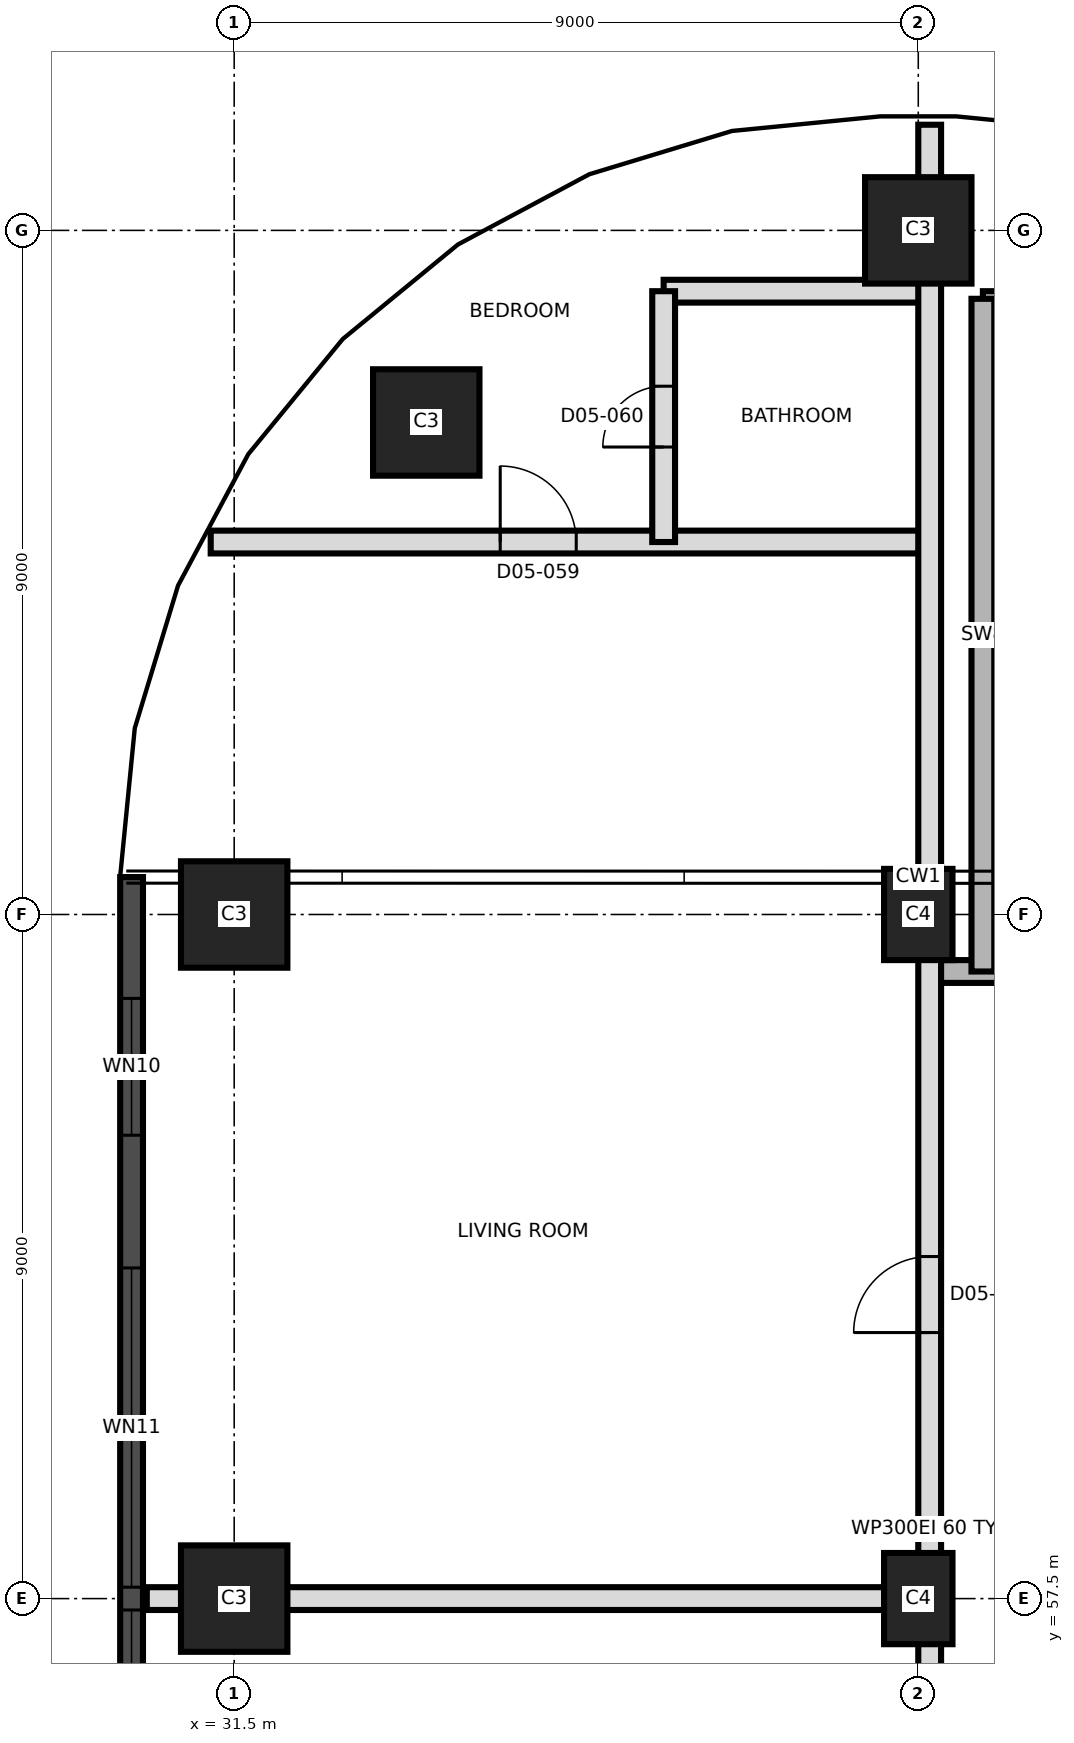
"""IFC4 building model, lengths in metres.
Left out: names, types, materials, properties, quantities, classifications, styles, units other than length and angle.
Written with IfcOpenShell. Run it as: python <this file> out.ifc"""

import sys

from ifc_helpers import new_model, si_unit, direction, frame, frame_2d, origin, origin_2d, place, context, subcontext, project, spatial, rectangle, extrude, element, fill, save


model = new_model("IFC4")
c1 = context("Model", 3, precision=1e-05, world=origin(), true_north=direction((0.0, 1.0)))
c2 = subcontext(c1, "Body", "Model", "MODEL_VIEW")
j1 = project(units=[si_unit("LENGTHUNIT", "METRE"), si_unit("PLANEANGLEUNIT", "RADIAN")], contexts=[c1])
p1 = place(None, origin())
s1 = spatial("IfcSite", under=j1, at=p1, CompositionType="ELEMENT")
p2 = place(p1, origin())
s2 = spatial("IfcBuilding", under=s1, at=p2, CompositionType="ELEMENT")
p3 = place(p2, frame((0.0, 0.0, 74.2)))
s3 = spatial("IfcBuildingStorey", under=s2, at=p3, CompositionType="ELEMENT", Elevation=74.2)
p4 = place(p3, frame((31.5, 57.5, 0.0), z_axis=(0.0, 0.0, 1.0), x_axis=(1.0, 0.0, 0.0)))
e1 = element("IfcColumn", 1, at=p4, inside=s3, PredefinedType="COLUMN", context=c2, shape_type="SweptSolid", body=[
    extrude(rectangle(XDim=1.4, YDim=1.4, at=origin_2d()), origin(), (0.0, 0.0, 1.0), 3.7),
])
p5 = place(p3, frame((40.5, 57.5, 0.0), z_axis=(0.0, 0.0, 1.0), x_axis=(0.0, 1.0, 0.0)))
e2 = element("IfcColumn", 2, at=p5, inside=s3, PredefinedType="COLUMN", context=c2, shape_type="SweptSolid", body=[
    extrude(rectangle(XDim=1.2, YDim=0.9, at=origin_2d()), origin(), (0.0, 0.0, 1.0), 3.7),
])
p6 = place(p3, frame((31.5, 66.5, 0.0), z_axis=(0.0, 0.0, 1.0), x_axis=(1.0, 0.0, 0.0)))
e3 = element("IfcColumn", 3, at=p6, inside=s3, PredefinedType="COLUMN", context=c2, shape_type="SweptSolid", body=[
    extrude(rectangle(XDim=1.4, YDim=1.4, at=origin_2d()), origin(), (0.0, 0.0, 1.0), 3.7),
])
p7 = place(p3, frame((40.5, 66.5, 0.0), z_axis=(0.0, 0.0, 1.0), x_axis=(0.0, 1.0, 0.0)))
e4 = element("IfcColumn", 4, at=p7, inside=s3, PredefinedType="COLUMN", context=c2, shape_type="SweptSolid", body=[
    extrude(rectangle(XDim=1.2, YDim=0.9, at=origin_2d()), origin(), (0.0, 0.0, 1.0), 3.7),
])
for number, where, z_axis, x_axis in (
    (5, (34.027, 72.973, 0.0), (0.0, 0.0, 1.0), (1.0, 0.0, 0.0)),
    (6, (40.5, 75.5, 0.0), (0.0, 0.0, 1.0), (1.0, 0.0, 0.0)),
):
    element("IfcColumn", number, at=place(p3, frame(where, z_axis=z_axis, x_axis=x_axis)), inside=s3, PredefinedType="COLUMN", context=c2, shape_type="SweptSolid", body=[
        extrude(rectangle(XDim=1.4, YDim=1.4, at=origin_2d()), origin(), (0.0, 0.0, 1.0), 3.7),
    ])
p8 = place(p3, frame((30.15, 66.992, 0.0), z_axis=(0.0, 0.0, 1.0), x_axis=(0.0, -1.0, 0.0)))
e7 = element("IfcWall", 7, at=p8, inside=s3, PredefinedType="SOLIDWALL", context=c2, shape_type="SweptSolid", body=[
    extrude(rectangle(XDim=32.968, YDim=0.3, at=frame_2d((16.484, 0.0))), origin(), (0.0, 0.0, 1.0), 3.4),
])
p9 = place(p8, frame((1.596, 0.0, 0.3)))
e8 = element("IfcOpeningElement", 8, at=p9, cuts=e7, PredefinedType="OPENING", context=c2, shape_type="SweptSolid", body=[
    extrude(rectangle(XDim=1.8, YDim=2.4, at=frame_2d((0.9, 1.2))), frame((0.0, 0.16, 0.0), z_axis=(0.0, -1.0, 0.0), x_axis=(1.0, 0.0, 0.0)), (0.0, 0.0, 1.0), 0.32),
])
p10 = place(p8, frame((5.142, 0.0, 0.9)))
e9 = element("IfcOpeningElement", 9, at=p10, cuts=e7, PredefinedType="OPENING", context=c2, shape_type="SweptSolid", body=[
    extrude(rectangle(XDim=4.2, YDim=1.5, at=frame_2d((2.1, 0.75))), frame((0.0, 0.16, 0.0), z_axis=(0.0, -1.0, 0.0), x_axis=(1.0, 0.0, 0.0)), (0.0, 0.0, 1.0), 0.32),
])
p11 = place(p8, frame((9.642, 0.0, 0.9)))
e10 = element("IfcOpeningElement", 10, at=p11, cuts=e7, PredefinedType="OPENING", context=c2, shape_type="SweptSolid", body=[
    extrude(rectangle(XDim=4.2, YDim=1.5, at=frame_2d((2.1, 0.75))), frame((0.0, 0.16, 0.0), z_axis=(0.0, -1.0, 0.0), x_axis=(1.0, 0.0, 0.0)), (0.0, 0.0, 1.0), 0.32),
])
p12 = place(p8, frame((14.142, 0.0, 0.9)))
e11 = element("IfcOpeningElement", 11, at=p12, cuts=e7, PredefinedType="OPENING", context=c2, shape_type="SweptSolid", body=[
    extrude(rectangle(XDim=4.2, YDim=1.5, at=frame_2d((2.1, 0.75))), frame((0.0, 0.16, 0.0), z_axis=(0.0, -1.0, 0.0), x_axis=(1.0, 0.0, 0.0)), (0.0, 0.0, 1.0), 0.32),
])
p13 = place(p8, frame((18.642, 0.0, 0.9)))
e12 = element("IfcOpeningElement", 12, at=p13, cuts=e7, PredefinedType="OPENING", context=c2, shape_type="SweptSolid", body=[
    extrude(rectangle(XDim=4.2, YDim=1.5, at=frame_2d((2.1, 0.75))), frame((0.0, 0.16, 0.0), z_axis=(0.0, -1.0, 0.0), x_axis=(1.0, 0.0, 0.0)), (0.0, 0.0, 1.0), 0.32),
])
p14 = place(p8, frame((23.142, 0.0, 0.9)))
e13 = element("IfcOpeningElement", 13, at=p14, cuts=e7, PredefinedType="OPENING", context=c2, shape_type="SweptSolid", body=[
    extrude(rectangle(XDim=4.2, YDim=1.5, at=frame_2d((2.1, 0.75))), frame((0.0, 0.16, 0.0), z_axis=(0.0, -1.0, 0.0), x_axis=(1.0, 0.0, 0.0)), (0.0, 0.0, 1.0), 0.32),
])
p15 = place(p8, frame((29.33, 0.0, 0.3)))
e14 = element("IfcOpeningElement", 14, at=p15, cuts=e7, PredefinedType="OPENING", context=c2, shape_type="SweptSolid", body=[
    extrude(rectangle(XDim=1.8, YDim=2.4, at=frame_2d((0.9, 1.2))), frame((0.0, 0.16, 0.0), z_axis=(0.0, -1.0, 0.0), x_axis=(1.0, 0.0, 0.0)), (0.0, 0.0, 1.0), 0.32),
])
p16 = place(p3, frame((30.35, 57.5, 0.0), z_axis=(0.0, 0.0, 1.0), x_axis=(1.0, 0.0, 0.0)))
e15 = element("IfcWall", 15, at=p16, inside=s3, PredefinedType="PARTITIONING", context=c2, shape_type="SweptSolid", body=[
    extrude(rectangle(XDim=10.3, YDim=0.3, at=frame_2d((5.15, 0.0))), origin(), (0.0, 0.0, 1.0), 3.4),
])
p17 = place(p3, frame((40.65, 65.75, 0.0), z_axis=(0.0, 0.0, 1.0), x_axis=(1.0, 0.0, 0.0)))
e16 = element("IfcWall", 16, at=p17, inside=s3, PredefinedType="SHEAR", context=c2, shape_type="SweptSolid", body=[
    extrude(rectangle(XDim=3.7, YDim=0.3, at=frame_2d((1.85, 0.0))), origin(), (0.0, 0.0, 1.0), 3.4),
])
p18 = place(p17, frame((1.1, 0.0, 0.0)))
e17 = element("IfcOpeningElement", 17, at=p18, cuts=e16, PredefinedType="OPENING", context=c2, shape_type="SweptSolid", body=[
    extrude(rectangle(XDim=1.2, YDim=2.1, at=frame_2d((0.6, 1.05))), frame((0.0, 0.16, 0.0), z_axis=(0.0, -1.0, 0.0), x_axis=(1.0, 0.0, 0.0)), (0.0, 0.0, 1.0), 0.32),
])
p19 = place(p3, frame((31.191, 71.4, 0.0), z_axis=(0.0, 0.0, 1.0), x_axis=(1.0, 0.0, 0.0)))
e18 = element("IfcWall", 18, at=p19, inside=s3, PredefinedType="PARTITIONING", context=c2, shape_type="SweptSolid", body=[
    extrude(rectangle(XDim=9.459, YDim=0.3, at=frame_2d((4.729, 0.0))), origin(), (0.0, 0.0, 1.0), 3.4),
])
p20 = place(p19, frame((3.809, 0.0, 0.0)))
e19 = element("IfcOpeningElement", 19, at=p20, cuts=e18, PredefinedType="OPENING", context=c2, shape_type="SweptSolid", body=[
    extrude(rectangle(XDim=1.0, YDim=2.1, at=frame_2d((0.5, 1.05))), frame((0.0, 0.16, 0.0), z_axis=(0.0, -1.0, 0.0), x_axis=(1.0, 0.0, 0.0)), (0.0, 0.0, 1.0), 0.32),
])
p21 = place(p3, frame((41.35, 74.55, 0.0), z_axis=(0.0, 0.0, 1.0), x_axis=(1.0, 0.0, 0.0)))
e20 = element("IfcWall", 20, at=p21, inside=s3, PredefinedType="SHEAR", context=c2, shape_type="SweptSolid", body=[
    extrude(rectangle(XDim=3.0, YDim=0.3, at=frame_2d((1.5, 0.0))), origin(), (0.0, 0.0, 1.0), 3.4),
])
p22 = place(p3, frame((37.15, 74.7, 0.0), z_axis=(0.0, 0.0, 1.0), x_axis=(1.0, 0.0, 0.0)))
e21 = element("IfcWall", 21, at=p22, inside=s3, PredefinedType="PARTITIONING", context=c2, shape_type="SweptSolid", body=[
    extrude(rectangle(XDim=3.5, YDim=0.3, at=frame_2d((1.75, 0.0))), origin(), (0.0, 0.0, 1.0), 3.4),
])
p23 = place(p3, frame((37.15, 71.4, 0.0), z_axis=(0.0, 0.0, 1.0), x_axis=(0.0, 1.0, 0.0)))
e22 = element("IfcWall", 22, at=p23, inside=s3, PredefinedType="PARTITIONING", context=c2, shape_type="SweptSolid", body=[
    extrude(rectangle(XDim=3.3, YDim=0.3, at=frame_2d((1.65, 0.0))), origin(), (0.0, 0.0, 1.0), 3.4),
])
p24 = place(p23, frame((1.25, 0.0, 0.0)))
e23 = element("IfcOpeningElement", 23, at=p24, cuts=e22, PredefinedType="OPENING", context=c2, shape_type="SweptSolid", body=[
    extrude(rectangle(XDim=0.8, YDim=2.1, at=frame_2d((0.4, 1.05))), frame((0.0, 0.16, 0.0), z_axis=(0.0, -1.0, 0.0), x_axis=(1.0, 0.0, 0.0)), (0.0, 0.0, 1.0), 0.32),
])
p25 = place(p3, frame((40.65, 39.95, 0.0), z_axis=(0.0, 0.0, 1.0), x_axis=(0.0, 1.0, 0.0)))
e24 = element("IfcWall", 24, at=p25, inside=s3, PredefinedType="PARTITIONING", context=c2, shape_type="SweptSolid", body=[
    extrude(rectangle(XDim=36.94, YDim=0.3, at=frame_2d((18.47, 0.0))), origin(), (0.0, 0.0, 1.0), 3.4),
])
p26 = place(p25, frame((0.7, 0.0, 0.0)))
e25 = element("IfcOpeningElement", 25, at=p26, cuts=e24, PredefinedType="OPENING", context=c2, shape_type="SweptSolid", body=[
    extrude(rectangle(XDim=1.0, YDim=2.1, at=frame_2d((0.5, 1.05))), frame((0.0, 0.16, 0.0), z_axis=(0.0, -1.0, 0.0), x_axis=(1.0, 0.0, 0.0)), (0.0, 0.0, 1.0), 0.32),
])
p27 = place(p25, frame((6.55, 0.0, 0.0)))
e26 = element("IfcOpeningElement", 26, at=p27, cuts=e24, PredefinedType="OPENING", context=c2, shape_type="SweptSolid", body=[
    extrude(rectangle(XDim=1.0, YDim=2.1, at=frame_2d((0.5, 1.05))), frame((0.0, 0.16, 0.0), z_axis=(0.0, -1.0, 0.0), x_axis=(1.0, 0.0, 0.0)), (0.0, 0.0, 1.0), 0.32),
])
p28 = place(p25, frame((9.22, 0.0, 0.0)))
e27 = element("IfcOpeningElement", 27, at=p28, cuts=e24, PredefinedType="OPENING", context=c2, shape_type="SweptSolid", body=[
    extrude(rectangle(XDim=1.0, YDim=2.1, at=frame_2d((0.5, 1.05))), frame((0.0, 0.16, 0.0), z_axis=(0.0, -1.0, 0.0), x_axis=(1.0, 0.0, 0.0)), (0.0, 0.0, 1.0), 0.32),
])
p29 = place(p25, frame((15.07, 0.0, 0.0)))
e28 = element("IfcOpeningElement", 28, at=p29, cuts=e24, PredefinedType="OPENING", context=c2, shape_type="SweptSolid", body=[
    extrude(rectangle(XDim=1.0, YDim=2.1, at=frame_2d((0.5, 1.05))), frame((0.0, 0.16, 0.0), z_axis=(0.0, -1.0, 0.0), x_axis=(1.0, 0.0, 0.0)), (0.0, 0.0, 1.0), 0.32),
])
p30 = place(p25, frame((21.05, 0.0, 0.0)))
e29 = element("IfcOpeningElement", 29, at=p30, cuts=e24, PredefinedType="OPENING", context=c2, shape_type="SweptSolid", body=[
    extrude(rectangle(XDim=1.0, YDim=2.4, at=frame_2d((0.5, 1.2))), frame((0.0, 0.16, 0.0), z_axis=(0.0, -1.0, 0.0), x_axis=(1.0, 0.0, 0.0)), (0.0, 0.0, 1.0), 0.32),
])
p31 = place(p3, frame((41.35, 65.75, 0.0), z_axis=(0.0, 0.0, 1.0), x_axis=(0.0, 1.0, 0.0)))
e30 = element("IfcWall", 30, at=p31, inside=s3, PredefinedType="SHEAR", context=c2, shape_type="SweptSolid", body=[
    extrude(rectangle(XDim=8.85, YDim=0.3, at=frame_2d((4.425, 0.0))), origin(), (0.0, 0.0, 1.0), 3.4),
])
p32 = place(p9, origin())
e31 = element("IfcWindow", 31, at=p32, inside=s3, PartitioningType="SINGLE_PANEL", PredefinedType="WINDOW", context=c2, shape_type="SweptSolid", body=[
    extrude(rectangle(XDim=1.8, YDim=2.4, at=frame_2d((0.9, 1.2))), frame((0.0, 0.03, 0.0), z_axis=(0.0, -1.0, 0.0), x_axis=(1.0, 0.0, 0.0)), (0.0, 0.0, 1.0), 0.06),
])
fill(e8, e31)
p33 = place(p10, origin())
e32 = element("IfcWindow", 32, at=p33, inside=s3, PartitioningType="SINGLE_PANEL", PredefinedType="WINDOW", context=c2, shape_type="SweptSolid", body=[
    extrude(rectangle(XDim=4.2, YDim=1.5, at=frame_2d((2.1, 0.75))), frame((0.0, 0.03, 0.0), z_axis=(0.0, -1.0, 0.0), x_axis=(1.0, 0.0, 0.0)), (0.0, 0.0, 1.0), 0.06),
])
fill(e9, e32)
p34 = place(p11, origin())
e33 = element("IfcWindow", 33, at=p34, inside=s3, PartitioningType="SINGLE_PANEL", PredefinedType="WINDOW", context=c2, shape_type="SweptSolid", body=[
    extrude(rectangle(XDim=4.2, YDim=1.5, at=frame_2d((2.1, 0.75))), frame((0.0, 0.03, 0.0), z_axis=(0.0, -1.0, 0.0), x_axis=(1.0, 0.0, 0.0)), (0.0, 0.0, 1.0), 0.06),
])
fill(e10, e33)
p35 = place(p30, origin())
e34 = element("IfcDoor", 34, at=p35, inside=s3, OperationType="SINGLE_SWING_RIGHT", PredefinedType="DOOR", context=c2, shape_type="SweptSolid", body=[
    extrude(rectangle(XDim=1.0, YDim=2.4, at=frame_2d((0.5, 1.2))), frame((0.0, 0.025, 0.0), z_axis=(0.0, -1.0, 0.0), x_axis=(1.0, 0.0, 0.0)), (0.0, 0.0, 1.0), 0.05),
])
fill(e29, e34)
p36 = place(p20, origin())
e35 = element("IfcDoor", 35, at=p36, inside=s3, OperationType="SINGLE_SWING_LEFT", PredefinedType="DOOR", context=c2, shape_type="SweptSolid", body=[
    extrude(rectangle(XDim=1.0, YDim=2.1, at=frame_2d((0.5, 1.05))), frame((0.0, 0.025, 0.0), z_axis=(0.0, -1.0, 0.0), x_axis=(1.0, 0.0, 0.0)), (0.0, 0.0, 1.0), 0.05),
])
fill(e19, e35)
p37 = place(p24, origin())
e36 = element("IfcDoor", 36, at=p37, inside=s3, OperationType="SINGLE_SWING_LEFT", PredefinedType="DOOR", context=c2, shape_type="SweptSolid", body=[
    extrude(rectangle(XDim=0.8, YDim=2.1, at=frame_2d((0.4, 1.05))), frame((0.0, 0.025, 0.0), z_axis=(0.0, -1.0, 0.0), x_axis=(1.0, 0.0, 0.0)), (0.0, 0.0, 1.0), 0.05),
])
fill(e23, e36)
save(model, sys.argv[1])
